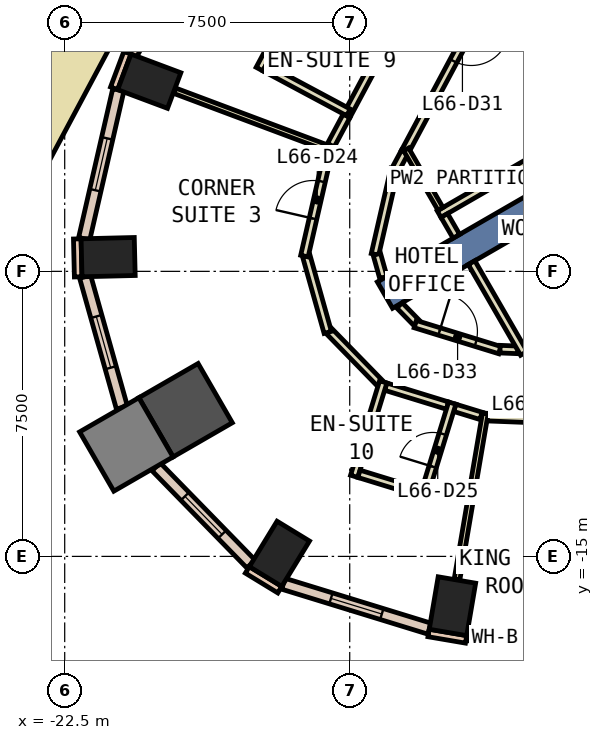
"""IFC4 building model, lengths in metres.
Left out: names, types, materials, properties, quantities, classifications, styles, units other than length and angle.
Written with IfcOpenShell. Run it as: python <this file> out.ifc"""

import sys

from ifc_helpers import new_model, si_unit, direction, frame, frame_2d, origin, origin_2d, place, context, subcontext, project, spatial, rectangle, extrude, element, fill, save


model = new_model("IFC4")
c1 = context("Model", 3, precision=1e-05, world=origin(), true_north=direction((0.0, 1.0)))
c2 = subcontext(c1, "Body", "Model", "MODEL_VIEW")
j1 = project(units=[si_unit("LENGTHUNIT", "METRE"), si_unit("PLANEANGLEUNIT", "RADIAN")], contexts=[c1])
p1 = place(None, origin())
s1 = spatial("IfcSite", under=j1, at=p1, CompositionType="ELEMENT")
p2 = place(p1, origin())
s2 = spatial("IfcBuilding", under=s1, at=p2, CompositionType="ELEMENT")
p3 = place(p2, frame((0.0, 0.0, 286.4)))
s3 = spatial("IfcBuildingStorey", under=s2, at=p3, CompositionType="ELEMENT", Elevation=286.4)
for number, where, z_axis, x_axis in (
    (1, (-12.297, -16.311, 0.0), (0.0, 0.0, 1.0), (-0.986, 0.168, 0.0)),
    (2, (-20.275, -2.497, 0.0), (0.0, 0.0, 1.0), (0.351, 0.936, 0.0)),
    (3, (-21.357, -7.126, 0.0), (0.0, 0.0, 1.0), (-0.024, 1.0, 0.0)),
):
    element("IfcColumn", number, at=place(p3, frame(where, z_axis=z_axis, x_axis=x_axis)), inside=s3, PredefinedType="COLUMN", context=c2, shape_type="SweptSolid", body=[
        extrude(rectangle(XDim=1.0, YDim=1.4, at=origin_2d()), origin(), (0.0, 0.0, 1.0), 3.26),
    ])
p4 = place(p3, frame((-19.319, -11.154, 0.0), z_axis=(0.0, 0.0, 1.0), x_axis=(0.866025403784, 0.5, 0.0)))
e4 = element("IfcColumn", 4, at=p4, inside=s3, PredefinedType="COLUMN", context=c2, shape_type="SweptSolid", body=[
    extrude(rectangle(XDim=1.8, YDim=1.8, at=origin_2d()), origin(), (0.0, 0.0, 1.0), 3.26),
])
p5 = place(p3, frame((-16.85, -14.933, 0.0), z_axis=(0.0, 0.0, 1.0), x_axis=(-0.853650808213, 0.520845752251, 0.0)))
e5 = element("IfcColumn", 5, at=p5, inside=s3, PredefinedType="COLUMN", context=c2, shape_type="SweptSolid", body=[
    extrude(rectangle(XDim=1.0, YDim=1.4, at=origin_2d()), origin(), (0.0, 0.0, 1.0), 3.26),
])
p6 = place(p3, frame((-20.878, -12.054, 0.0), z_axis=(0.0, 0.0, 1.0), x_axis=(0.866025403784, 0.5, 0.0)))
e6 = element("IfcColumn", 6, at=p6, inside=s3, PredefinedType="COLUMN", context=c2, shape_type="SweptSolid", body=[
    extrude(rectangle(XDim=1.8, YDim=1.8, at=origin_2d()), origin(), (0.0, 0.0, 1.0), 3.26),
])
p7 = place(p3, frame((-6.279, -3.625, -0.6), z_axis=(0.0, 0.0, 1.0), x_axis=(-0.866017533419, -0.500013631625, 0.0)))
e7 = element("IfcWall", 7, at=p7, inside=s3, PredefinedType="SHEAR", context=c2, shape_type="SweptSolid", body=[
    extrude(rectangle(XDim=9.0, YDim=0.8, at=frame_2d((4.5, 0.0))), origin(), (0.0, 0.0, 1.0), 3.86),
])
p8 = place(p3, frame((-20.849, -1.748, 0.0), z_axis=(0.0, 0.0, 1.0), x_axis=(-0.350962844851, -0.936389385637, 0.0)))
e8 = element("IfcWall", 8, at=p8, inside=s3, PredefinedType="STANDARD", context=c2, shape_type="SweptSolid", body=[
    extrude(rectangle(XDim=1.0, YDim=0.2, at=frame_2d((0.5, 0.0))), origin(), (0.0, 0.0, 1.0), 3.26),
])
p9 = place(p3, frame((-12.924, -17.015, 0.0), z_axis=(0.0, 0.0, 1.0), x_axis=(0.985760116403, -0.168157643031, 0.0)))
e9 = element("IfcWall", 9, at=p9, inside=s3, PredefinedType="STANDARD", context=c2, shape_type="SweptSolid", body=[
    extrude(rectangle(XDim=1.0, YDim=0.2, at=frame_2d((0.5, 0.0))), origin(), (0.0, 0.0, 1.0), 3.26),
])
p10 = place(p3, frame((-22.169, -6.646, 0.0), z_axis=(0.0, 0.0, 1.0), x_axis=(0.023942303888, -0.999713341956, 0.0)))
e10 = element("IfcWall", 10, at=p10, inside=s3, PredefinedType="STANDARD", context=c2, shape_type="SweptSolid", body=[
    extrude(rectangle(XDim=0.999, YDim=0.2, at=frame_2d((0.5, 0.0))), origin(), (0.0, 0.0, 1.0), 3.26),
])
p11 = place(p3, frame((-17.694, -15.355, 0.0), z_axis=(0.0, 0.0, 1.0), x_axis=(0.853679739553, -0.520798331677, 0.0)))
e11 = element("IfcWall", 11, at=p11, inside=s3, PredefinedType="STANDARD", context=c2, shape_type="SweptSolid", body=[
    extrude(rectangle(XDim=1.0, YDim=0.2, at=frame_2d((0.5, 0.0))), origin(), (0.0, 0.0, 1.0), 3.26),
])
p12 = place(p3, frame((-11.92, -17.069, 0.0), z_axis=(0.0, 0.0, 1.0), x_axis=(0.999234893779, -0.039110446866, 0.0)))
e12 = element("IfcWall", 12, at=p12, inside=s3, PredefinedType="STANDARD", context=c2, shape_type="SweptSolid", body=[
    extrude(rectangle(XDim=3.627, YDim=0.3, at=frame_2d((1.813, 0.0))), origin(), (0.0, 0.0, 1.0), 3.26),
])
p13 = place(p12, frame((1.113, 0.0, 0.9)))
e13 = element("IfcOpeningElement", 13, at=p13, cuts=e12, PredefinedType="OPENING", context=c2, shape_type="SweptSolid", body=[
    extrude(rectangle(XDim=1.4, YDim=2.0, at=frame_2d((0.7, 1.0))), frame((0.0, 0.16, 0.0), z_axis=(0.0, -1.0, 0.0), x_axis=(1.0, 0.0, 0.0)), (0.0, 0.0, 1.0), 0.32),
])
p14 = place(p3, frame((-17.306, 4.626, 0.0), z_axis=(0.0, 0.0, 1.0), x_axis=(-0.471789353675, -0.881711293882, 0.0)))
e14 = element("IfcWall", 14, at=p14, inside=s3, PredefinedType="STANDARD", context=c2, shape_type="SweptSolid", body=[
    extrude(rectangle(XDim=7.277, YDim=0.3, at=frame_2d((3.638, 0.0))), origin(), (0.0, 0.0, 1.0), 3.26),
])
p15 = place(p14, frame((0.719, 0.0, 0.9)))
e15 = element("IfcOpeningElement", 15, at=p15, cuts=e14, PredefinedType="OPENING", context=c2, shape_type="SweptSolid", body=[
    extrude(rectangle(XDim=2.2, YDim=2.0, at=frame_2d((1.1, 1.0))), frame((0.0, 0.16, 0.0), z_axis=(0.0, -1.0, 0.0), x_axis=(1.0, 0.0, 0.0)), (0.0, 0.0, 1.0), 0.32),
])
p16 = place(p14, frame((4.358, 0.0, 0.9)))
e16 = element("IfcOpeningElement", 16, at=p16, cuts=e14, PredefinedType="OPENING", context=c2, shape_type="SweptSolid", body=[
    extrude(rectangle(XDim=2.2, YDim=2.0, at=frame_2d((1.1, 1.0))), frame((0.0, 0.16, 0.0), z_axis=(0.0, -1.0, 0.0), x_axis=(1.0, 0.0, 0.0)), (0.0, 0.0, 1.0), 0.32),
])
p17 = place(p3, frame((-21.089, -2.725, 0.0), z_axis=(0.0, 0.0, 1.0), x_axis=(-0.223448307338, -0.974715781112, 0.0)))
e17 = element("IfcWall", 17, at=p17, inside=s3, PredefinedType="STANDARD", context=c2, shape_type="SweptSolid", body=[
    extrude(rectangle(XDim=4.019, YDim=0.3, at=frame_2d((2.009, 0.0))), origin(), (0.0, 0.0, 1.0), 3.26),
])
p18 = place(p17, frame((1.309, 0.0, 0.9)))
e18 = element("IfcOpeningElement", 18, at=p18, cuts=e17, PredefinedType="OPENING", context=c2, shape_type="SweptSolid", body=[
    extrude(rectangle(XDim=1.4, YDim=2.0, at=frame_2d((0.7, 1.0))), frame((0.0, 0.16, 0.0), z_axis=(0.0, -1.0, 0.0), x_axis=(1.0, 0.0, 0.0)), (0.0, 0.0, 1.0), 0.32),
])
p19 = place(p3, frame((-21.963, -7.64, 0.0), z_axis=(0.0, 0.0, 1.0), x_axis=(0.270589405397, -0.962694849725, 0.0)))
e19 = element("IfcWall", 19, at=p19, inside=s3, PredefinedType="STANDARD", context=c2, shape_type="SweptSolid", body=[
    extrude(rectangle(XDim=3.577, YDim=0.3, at=frame_2d((1.788, 0.0))), origin(), (0.0, 0.0, 1.0), 3.26),
])
p20 = place(p19, frame((1.088, 0.0, 0.9)))
e20 = element("IfcOpeningElement", 20, at=p20, cuts=e19, PredefinedType="OPENING", context=c2, shape_type="SweptSolid", body=[
    extrude(rectangle(XDim=1.4, YDim=2.0, at=frame_2d((0.7, 1.0))), frame((0.0, 0.16, 0.0), z_axis=(0.0, -1.0, 0.0), x_axis=(1.0, 0.0, 0.0)), (0.0, 0.0, 1.0), 0.32),
])
p21 = place(p3, frame((-20.096, -12.641, 0.0), z_axis=(0.0, 0.0, 1.0), x_axis=(0.698555868355, -0.715555517614, 0.0)))
e21 = element("IfcWall", 21, at=p21, inside=s3, PredefinedType="STANDARD", context=c2, shape_type="SweptSolid", body=[
    extrude(rectangle(XDim=3.576, YDim=0.3, at=frame_2d((1.788, 0.0))), origin(), (0.0, 0.0, 1.0), 3.26),
])
p22 = place(p21, frame((1.088, 0.0, 0.9)))
e22 = element("IfcOpeningElement", 22, at=p22, cuts=e21, PredefinedType="OPENING", context=c2, shape_type="SweptSolid", body=[
    extrude(rectangle(XDim=1.4, YDim=2.0, at=frame_2d((0.7, 1.0))), frame((0.0, 0.16, 0.0), z_axis=(0.0, -1.0, 0.0), x_axis=(1.0, 0.0, 0.0)), (0.0, 0.0, 1.0), 0.32),
])
p23 = place(p3, frame((-16.746, -15.72, 0.0), z_axis=(0.0, 0.0, 1.0), x_axis=(0.955866957005, -0.293799864716, 0.0)))
e23 = element("IfcWall", 23, at=p23, inside=s3, PredefinedType="STANDARD", context=c2, shape_type="SweptSolid", body=[
    extrude(rectangle(XDim=4.02, YDim=0.3, at=frame_2d((2.01, 0.0))), origin(), (0.0, 0.0, 1.0), 3.26),
])
p24 = place(p23, frame((1.31, 0.0, 0.9)))
e24 = element("IfcOpeningElement", 24, at=p24, cuts=e23, PredefinedType="OPENING", context=c2, shape_type="SweptSolid", body=[
    extrude(rectangle(XDim=1.4, YDim=2.0, at=frame_2d((0.7, 1.0))), frame((0.0, 0.16, 0.0), z_axis=(0.0, -1.0, 0.0), x_axis=(1.0, 0.0, 0.0)), (0.0, 0.0, 1.0), 0.32),
])
p25 = place(p3, frame((-21.587, -0.103, 0.0), z_axis=(0.0, 0.0, 1.0), x_axis=(-0.470902401725, -0.882185313894, 0.0)))
e25 = element("IfcWall", 25, at=p25, inside=s3, PredefinedType="STANDARD", context=c2, shape_type="SweptSolid", body=[
    extrude(rectangle(XDim=4.799, YDim=1.9, at=frame_2d((2.4, 0.0))), origin(), (0.0, 0.0, 1.0), 0.8),
])
p26 = place(p3, frame((-10.639, 1.084, 0.0), z_axis=(0.0, 0.0, 1.0), x_axis=(-0.471696599276, -0.881760918975, 0.0)))
e26 = element("IfcWall", 26, at=p26, inside=s3, PredefinedType="PARTITIONING", context=c2, shape_type="SweptSolid", body=[
    extrude(rectangle(XDim=6.172, YDim=0.2, at=frame_2d((3.086, 0.0))), origin(), (0.0, 0.0, 1.0), 3.26),
])
p27 = place(p26, frame((2.458, 0.0, 0.0)))
e27 = element("IfcOpeningElement", 27, at=p27, cuts=e26, PredefinedType="OPENING", context=c2, shape_type="SweptSolid", body=[
    extrude(rectangle(XDim=1.0, YDim=2.1, at=frame_2d((0.5, 1.05))), frame((0.0, 0.11, 0.0), z_axis=(0.0, -1.0, 0.0), x_axis=(1.0, 0.0, 0.0)), (0.0, 0.0, 1.0), 0.22),
])
p28 = place(p3, frame((-13.55, -4.358, 0.0), z_axis=(0.0, 0.0, 1.0), x_axis=(-0.472169364753, -0.881507850781, 0.0)))
e28 = element("IfcWall", 28, at=p28, inside=s3, PredefinedType="PARTITIONING", context=c2, shape_type="SweptSolid", body=[
    extrude(rectangle(XDim=0.521, YDim=0.2, at=frame_2d((0.26, 0.0))), origin(), (0.0, 0.0, 1.0), 3.26),
])
p29 = place(p3, frame((-13.821, -4.808, 0.0), z_axis=(0.0, 0.0, 1.0), x_axis=(-0.223248099856, -0.97476165595, 0.0)))
e29 = element("IfcWall", 29, at=p29, inside=s3, PredefinedType="PARTITIONING", context=c2, shape_type="SweptSolid", body=[
    extrude(rectangle(XDim=2.302, YDim=0.2, at=frame_2d((1.151, 0.0))), origin(), (0.0, 0.0, 1.0), 3.26),
])
p30 = place(p3, frame((-14.286, -7.051, 0.0), z_axis=(0.0, 0.0, 1.0), x_axis=(0.270633612894, -0.96268242301, 0.0)))
e30 = element("IfcWall", 30, at=p30, inside=s3, PredefinedType="PARTITIONING", context=c2, shape_type="SweptSolid", body=[
    extrude(rectangle(XDim=0.632, YDim=0.2, at=frame_2d((0.316, 0.0))), origin(), (0.0, 0.0, 1.0), 3.26),
])
p31 = place(p3, frame((-13.69, -8.395, 0.0), z_axis=(0.0, 0.0, 1.0), x_axis=(0.698333537371, -0.715772499181, 0.0)))
e31 = element("IfcWall", 31, at=p31, inside=s3, PredefinedType="PARTITIONING", context=c2, shape_type="SweptSolid", body=[
    extrude(rectangle(XDim=0.63, YDim=0.2, at=frame_2d((0.315, 0.0))), origin(), (0.0, 0.0, 1.0), 3.26),
])
p32 = place(p3, frame((-13.275, -8.888, 0.0), z_axis=(0.0, 0.0, 1.0), x_axis=(0.955792602122, -0.294041666654, 0.0)))
e32 = element("IfcWall", 32, at=p32, inside=s3, PredefinedType="PARTITIONING", context=c2, shape_type="SweptSolid", body=[
    extrude(rectangle(XDim=2.33, YDim=0.2, at=frame_2d((1.165, 0.0))), origin(), (0.0, 0.0, 1.0), 3.26),
])
p33 = place(p32, frame((0.665, 0.0, 0.0)))
e33 = element("IfcOpeningElement", 33, at=p33, cuts=e32, PredefinedType="OPENING", context=c2, shape_type="SweptSolid", body=[
    extrude(rectangle(XDim=1.0, YDim=2.1, at=frame_2d((0.5, 1.05))), frame((0.0, 0.11, 0.0), z_axis=(0.0, -1.0, 0.0), x_axis=(1.0, 0.0, 0.0)), (0.0, 0.0, 1.0), 0.22),
])
p34 = place(p3, frame((-11.044, -9.547, 0.0), z_axis=(0.0, 0.0, 1.0), x_axis=(0.999224473046, -0.039375785274, 0.0)))
e34 = element("IfcWall", 34, at=p34, inside=s3, PredefinedType="PARTITIONING", context=c2, shape_type="SweptSolid", body=[
    extrude(rectangle(XDim=0.478, YDim=0.2, at=frame_2d((0.239, 0.0))), origin(), (0.0, 0.0, 1.0), 3.26),
])
p35 = place(p3, frame((-15.496, -4.18, 0.0), z_axis=(0.0, 0.0, 1.0), x_axis=(0.471280380621, 0.881983448167, 0.0)))
e35 = element("IfcWall", 35, at=p35, inside=s3, PredefinedType="PARTITIONING", context=c2, shape_type="SweptSolid", body=[
    extrude(rectangle(XDim=0.879, YDim=0.2, at=frame_2d((0.439, 0.0))), origin(), (0.0, 0.0, 1.0), 3.26),
])
p36 = place(p3, frame((-15.082, -3.405, 0.0), z_axis=(0.0, 0.0, 1.0), x_axis=(0.471719946084, 0.88174842924, 0.0)))
e36 = element("IfcWall", 36, at=p36, inside=s3, PredefinedType="PARTITIONING", context=c2, shape_type="SweptSolid", body=[
    extrude(rectangle(XDim=3.0, YDim=0.2, at=frame_2d((1.5, 0.0))), origin(), (0.0, 0.0, 1.0), 3.26),
])
p37 = place(p3, frame((-11.544, -11.303, 0.0), z_axis=(0.0, 0.0, 1.0), x_axis=(-0.956186468463, 0.292758326147, 0.0)))
e37 = element("IfcWall", 37, at=p37, inside=s3, PredefinedType="PARTITIONING", context=c2, shape_type="SweptSolid", body=[
    extrude(rectangle(XDim=0.724, YDim=0.2, at=frame_2d((0.362, 0.0))), origin(), (0.0, 0.0, 1.0), 3.26),
])
p38 = place(p3, frame((-14.147, -10.503, 0.0), z_axis=(0.0, 0.0, 1.0), x_axis=(-0.698515752779, 0.715594677957, 0.0)))
e38 = element("IfcWall", 38, at=p38, inside=s3, PredefinedType="PARTITIONING", context=c2, shape_type="SweptSolid", body=[
    extrude(rectangle(XDim=1.987, YDim=0.2, at=frame_2d((0.994, 0.0))), origin(), (0.0, 0.0, 1.0), 3.26),
])
p39 = place(p3, frame((-15.578, -9.106, 0.0), z_axis=(0.0, 0.0, 1.0), x_axis=(-0.270688011946, 0.962667128445, 0.0)))
e39 = element("IfcWall", 39, at=p39, inside=s3, PredefinedType="PARTITIONING", context=c2, shape_type="SweptSolid", body=[
    extrude(rectangle(XDim=2.088, YDim=0.2, at=frame_2d((1.044, 0.0))), origin(), (0.0, 0.0, 1.0), 3.26),
])
p40 = place(p3, frame((-16.192, -7.098, 0.0), z_axis=(0.0, 0.0, 1.0), x_axis=(0.22330023395, 0.974749714295, 0.0)))
e40 = element("IfcWall", 40, at=p40, inside=s3, PredefinedType="PARTITIONING", context=c2, shape_type="SweptSolid", body=[
    extrude(rectangle(XDim=2.928, YDim=0.2, at=frame_2d((1.464, 0.0))), origin(), (0.0, 0.0, 1.0), 3.26),
])
p41 = place(p40, frame((1.014, 0.0, 0.0)))
e41 = element("IfcOpeningElement", 41, at=p41, cuts=e40, PredefinedType="OPENING", context=c2, shape_type="SweptSolid", body=[
    extrude(rectangle(XDim=1.0, YDim=2.1, at=frame_2d((0.5, 1.05))), frame((0.0, 0.11, 0.0), z_axis=(0.0, -1.0, 0.0), x_axis=(1.0, 0.0, 0.0)), (0.0, 0.0, 1.0), 0.22),
])
p42 = place(p3, frame((-12.427, -11.032, 0.0), z_axis=(0.0, 0.0, 1.0), x_axis=(-0.955940341053, 0.293561006177, 0.0)))
e42 = element("IfcWall", 42, at=p42, inside=s3, PredefinedType="PARTITIONING", context=c2, shape_type="SweptSolid", body=[
    extrude(rectangle(XDim=1.7, YDim=0.2, at=frame_2d((0.85, 0.0))), origin(), (0.0, 0.0, 1.0), 3.26),
])
p43 = place(p3, frame((-10.299, -11.378, 0.0), z_axis=(0.0, 0.0, 1.0), x_axis=(-0.999237995813, 0.03903111224, 0.0)))
e43 = element("IfcWall", 43, at=p43, inside=s3, PredefinedType="PARTITIONING", context=c2, shape_type="SweptSolid", body=[
    extrude(rectangle(XDim=1.176, YDim=0.2, at=frame_2d((0.588, 0.0))), origin(), (0.0, 0.0, 1.0), 3.26),
])
p44 = place(p3, frame((-6.845, -2.643, 0.0), z_axis=(0.0, 0.0, 1.0), x_axis=(-0.865994457699, -0.500053596362, 0.0)))
e44 = element("IfcWall", 44, at=p44, inside=s3, PredefinedType="PARTITIONING", context=c2, shape_type="SweptSolid", body=[
    extrude(rectangle(XDim=6.701, YDim=0.2, at=frame_2d((3.351, 0.0))), origin(), (0.0, 0.0, 1.0), 3.26),
])
p45 = place(p3, frame((-12.611, -5.857, 0.0), z_axis=(0.0, 0.0, 1.0), x_axis=(-0.500120037633, 0.865956088932, 0.0)))
e45 = element("IfcWall", 45, at=p45, inside=s3, PredefinedType="PARTITIONING", context=c2, shape_type="SweptSolid", body=[
    extrude(rectangle(XDim=1.807, YDim=0.15, at=frame_2d((0.904, 0.0))), origin(), (0.0, 0.0, 1.0), 3.26),
])
p46 = place(p3, frame((-10.417, -9.657, 0.0), z_axis=(0.0, 0.0, 1.0), x_axis=(-0.499837531988, 0.866119184418, 0.0)))
e46 = element("IfcWall", 46, at=p46, inside=s3, PredefinedType="PARTITIONING", context=c2, shape_type="SweptSolid", body=[
    extrude(rectangle(XDim=2.755, YDim=0.2, at=frame_2d((1.377, 0.0))), origin(), (0.0, 0.0, 1.0), 3.26),
])
p47 = place(p3, frame((-15.865, 0.643, 0.0), z_axis=(0.0, 0.0, 1.0), x_axis=(-0.471677088066, -0.881771356188, 0.0)))
e47 = element("IfcWall", 47, at=p47, inside=s3, PredefinedType="PARTITIONING", context=c2, shape_type="SweptSolid", body=[
    extrude(rectangle(XDim=3.199, YDim=0.2, at=frame_2d((1.6, 0.0))), origin(), (0.0, 0.0, 1.0), 3.26),
])
p48 = place(p47, frame((1.15, 0.0, 0.0)))
e48 = element("IfcOpeningElement", 48, at=p48, cuts=e47, PredefinedType="OPENING", context=c2, shape_type="SweptSolid", body=[
    extrude(rectangle(XDim=0.9, YDim=2.1, at=frame_2d((0.45, 1.05))), frame((0.0, 0.11, 0.0), z_axis=(0.0, -1.0, 0.0), x_axis=(1.0, 0.0, 0.0)), (0.0, 0.0, 1.0), 0.22),
])
p49 = place(p3, frame((-17.239, -2.137, 0.0), z_axis=(0.0, 0.0, 1.0), x_axis=(0.881706262609, -0.471798756332, 0.0)))
e49 = element("IfcWall", 49, at=p49, inside=s3, PredefinedType="PARTITIONING", context=c2, shape_type="SweptSolid", body=[
    extrude(rectangle(XDim=2.501, YDim=0.2, at=frame_2d((1.25, 0.0))), origin(), (0.0, 0.0, 1.0), 3.26),
])
p50 = place(p3, frame((-15.45, -4.304, 0.0), z_axis=(0.0, 0.0, 1.0), x_axis=(-0.936458128132, 0.350779381172, 0.0)))
e50 = element("IfcWall", 50, at=p50, inside=s3, PredefinedType="PARTITIONING", context=c2, shape_type="SweptSolid", body=[
    extrude(rectangle(XDim=4.433, YDim=0.15, at=frame_2d((2.216, 0.0))), origin(), (0.0, 0.0, 1.0), 3.26),
])
p51 = place(p3, frame((-14.118, -10.408, 0.0), z_axis=(0.0, 0.0, 1.0), x_axis=(-0.293914282011, -0.955831781659, 0.0)))
e51 = element("IfcWall", 51, at=p51, inside=s3, PredefinedType="PARTITIONING", context=c2, shape_type="SweptSolid", body=[
    extrude(rectangle(XDim=2.6, YDim=0.2, at=frame_2d((1.3, 0.0))), origin(), (0.0, 0.0, 1.0), 3.26),
])
p52 = place(p3, frame((-14.757, -12.827, 0.0), z_axis=(0.0, 0.0, 1.0), x_axis=(0.955940341053, -0.293561006177, 0.0)))
e52 = element("IfcWall", 52, at=p52, inside=s3, PredefinedType="PARTITIONING", context=c2, shape_type="SweptSolid", body=[
    extrude(rectangle(XDim=1.7, YDim=0.2, at=frame_2d((0.85, 0.0))), origin(), (0.0, 0.0, 1.0), 3.26),
])
p53 = place(p3, frame((-13.066, -13.451, 0.0), z_axis=(0.0, 0.0, 1.0), x_axis=(0.293854864179, 0.955850050373, 0.0)))
e53 = element("IfcWall", 53, at=p53, inside=s3, PredefinedType="PARTITIONING", context=c2, shape_type="SweptSolid", body=[
    extrude(rectangle(XDim=2.6, YDim=0.2, at=frame_2d((1.3, 0.0))), origin(), (0.0, 0.0, 1.0), 3.26),
])
p54 = place(p53, frame((0.85, 0.0, 0.0)))
e54 = element("IfcOpeningElement", 54, at=p54, cuts=e53, PredefinedType="OPENING", context=c2, shape_type="SweptSolid", body=[
    extrude(rectangle(XDim=0.9, YDim=2.1, at=frame_2d((0.45, 1.05))), frame((0.0, 0.11, 0.0), z_axis=(0.0, -1.0, 0.0), x_axis=(1.0, 0.0, 0.0)), (0.0, 0.0, 1.0), 0.22),
])
p55 = place(p3, frame((-11.432, -11.234, 0.0), z_axis=(0.0, 0.0, 1.0), x_axis=(-0.16797255243, -0.98579167253, 0.0)))
e55 = element("IfcWall", 55, at=p55, inside=s3, PredefinedType="PARTITIONING", context=c2, shape_type="SweptSolid", body=[
    extrude(rectangle(XDim=4.43, YDim=0.15, at=frame_2d((2.215, 0.0))), origin(), (0.0, 0.0, 1.0), 3.26),
])
p56 = place(p3, frame((-12.194, -6.578, 0.0), z_axis=(0.0, 0.0, 1.0), x_axis=(-0.500701704226, 0.865619895442, 0.0)))
e56 = element("IfcWall", 56, at=p56, inside=s3, PredefinedType="PARTITIONING", context=c2, shape_type="SweptSolid", body=[
    extrude(rectangle(XDim=0.633, YDim=0.2, at=frame_2d((0.316, 0.0))), origin(), (0.0, 0.0, 1.0), 3.26),
])
p57 = place(p13, origin())
e57 = element("IfcWindow", 57, at=p57, inside=s3, PartitioningType="SINGLE_PANEL", PredefinedType="WINDOW", context=c2, shape_type="SweptSolid", body=[
    extrude(rectangle(XDim=1.4, YDim=2.0, at=frame_2d((0.7, 1.0))), frame((0.0, 0.03, 0.0), z_axis=(0.0, -1.0, 0.0), x_axis=(1.0, 0.0, 0.0)), (0.0, 0.0, 1.0), 0.06),
])
fill(e13, e57)
p58 = place(p18, origin())
e58 = element("IfcWindow", 58, at=p58, inside=s3, PartitioningType="SINGLE_PANEL", PredefinedType="WINDOW", context=c2, shape_type="SweptSolid", body=[
    extrude(rectangle(XDim=1.4, YDim=2.0, at=frame_2d((0.7, 1.0))), frame((0.0, 0.03, 0.0), z_axis=(0.0, -1.0, 0.0), x_axis=(1.0, 0.0, 0.0)), (0.0, 0.0, 1.0), 0.06),
])
fill(e18, e58)
p59 = place(p20, origin())
e59 = element("IfcWindow", 59, at=p59, inside=s3, PartitioningType="SINGLE_PANEL", PredefinedType="WINDOW", context=c2, shape_type="SweptSolid", body=[
    extrude(rectangle(XDim=1.4, YDim=2.0, at=frame_2d((0.7, 1.0))), frame((0.0, 0.03, 0.0), z_axis=(0.0, -1.0, 0.0), x_axis=(1.0, 0.0, 0.0)), (0.0, 0.0, 1.0), 0.06),
])
fill(e20, e59)
p60 = place(p22, origin())
e60 = element("IfcWindow", 60, at=p60, inside=s3, PartitioningType="SINGLE_PANEL", PredefinedType="WINDOW", context=c2, shape_type="SweptSolid", body=[
    extrude(rectangle(XDim=1.4, YDim=2.0, at=frame_2d((0.7, 1.0))), frame((0.0, 0.03, 0.0), z_axis=(0.0, -1.0, 0.0), x_axis=(1.0, 0.0, 0.0)), (0.0, 0.0, 1.0), 0.06),
])
fill(e22, e60)
p61 = place(p24, origin())
e61 = element("IfcWindow", 61, at=p61, inside=s3, PartitioningType="SINGLE_PANEL", PredefinedType="WINDOW", context=c2, shape_type="SweptSolid", body=[
    extrude(rectangle(XDim=1.4, YDim=2.0, at=frame_2d((0.7, 1.0))), frame((0.0, 0.03, 0.0), z_axis=(0.0, -1.0, 0.0), x_axis=(1.0, 0.0, 0.0)), (0.0, 0.0, 1.0), 0.06),
])
fill(e24, e61)
p62 = place(p41, origin())
e62 = element("IfcDoor", 62, at=p62, inside=s3, OperationType="SINGLE_SWING_LEFT", PredefinedType="DOOR", context=c2, shape_type="SweptSolid", body=[
    extrude(rectangle(XDim=1.0, YDim=2.1, at=frame_2d((0.5, 1.05))), frame((0.0, 0.025, 0.0), z_axis=(0.0, -1.0, 0.0), x_axis=(1.0, 0.0, 0.0)), (0.0, 0.0, 1.0), 0.05),
])
fill(e41, e62)
p63 = place(p54, origin())
e63 = element("IfcDoor", 63, at=p63, inside=s3, OperationType="SINGLE_SWING_LEFT", PredefinedType="DOOR", context=c2, shape_type="SweptSolid", body=[
    extrude(rectangle(XDim=0.9, YDim=2.1, at=frame_2d((0.45, 1.05))), frame((0.0, 0.025, 0.0), z_axis=(0.0, -1.0, 0.0), x_axis=(1.0, 0.0, 0.0)), (0.0, 0.0, 1.0), 0.05),
])
fill(e54, e63)
p64 = place(p27, origin())
e64 = element("IfcDoor", 64, at=p64, inside=s3, OperationType="SINGLE_SWING_LEFT", PredefinedType="DOOR", context=c2, shape_type="SweptSolid", body=[
    extrude(rectangle(XDim=1.0, YDim=2.1, at=frame_2d((0.5, 1.05))), frame((0.0, 0.025, 0.0), z_axis=(0.0, -1.0, 0.0), x_axis=(1.0, 0.0, 0.0)), (0.0, 0.0, 1.0), 0.05),
])
fill(e27, e64)
p65 = place(p33, origin())
e65 = element("IfcDoor", 65, at=p65, inside=s3, OperationType="SINGLE_SWING_LEFT", PredefinedType="DOOR", context=c2, shape_type="SweptSolid", body=[
    extrude(rectangle(XDim=1.0, YDim=2.1, at=frame_2d((0.5, 1.05))), frame((0.0, 0.025, 0.0), z_axis=(0.0, -1.0, 0.0), x_axis=(1.0, 0.0, 0.0)), (0.0, 0.0, 1.0), 0.05),
])
fill(e33, e65)
save(model, sys.argv[1])
